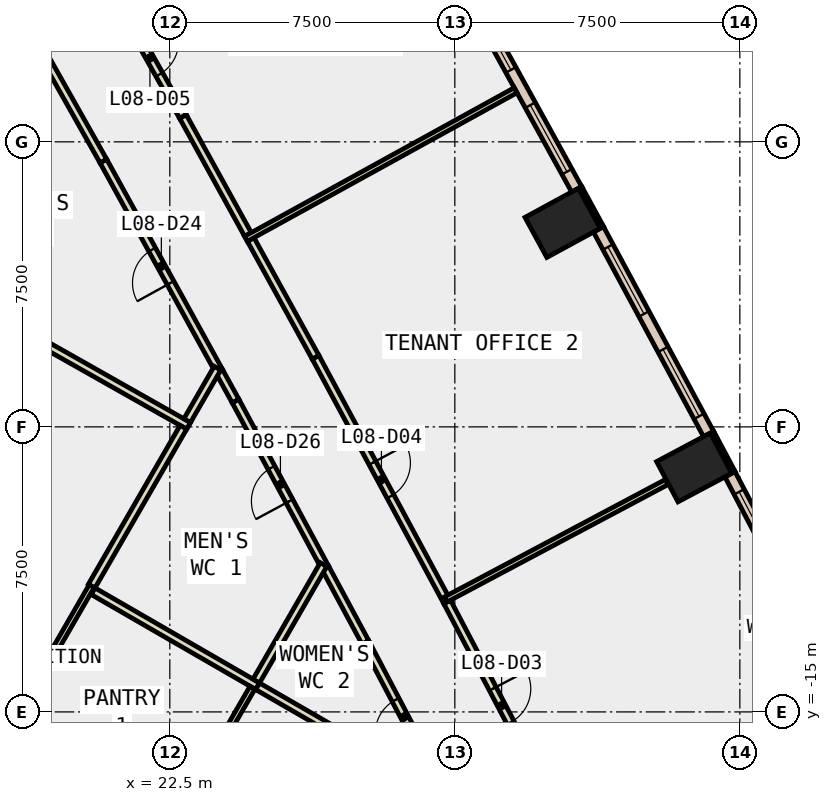
"""IFC4 building model, lengths in metres.
Left out: names, types, materials, properties, quantities, classifications, styles, units other than length and angle.
Written with IfcOpenShell. Run it as: python <this file> out.ifc"""

import sys

from ifc_helpers import new_model, si_unit, direction, frame, frame_2d, origin, origin_2d, place, context, subcontext, project, spatial, rectangle, extrude, element, fill, save


model = new_model("IFC4")
c1 = context("Model", 3, precision=1e-05, world=origin(), true_north=direction((0.0, 1.0)))
c2 = subcontext(c1, "Body", "Model", "MODEL_VIEW")
j1 = project(units=[si_unit("LENGTHUNIT", "METRE"), si_unit("PLANEANGLEUNIT", "RADIAN")], contexts=[c1])
p1 = place(None, origin())
s1 = spatial("IfcSite", under=j1, at=p1, CompositionType="ELEMENT")
p2 = place(p1, origin())
s2 = spatial("IfcBuilding", under=s1, at=p2, CompositionType="ELEMENT")
p3 = place(p2, frame((0.0, 0.0, 43.4)))
s3 = spatial("IfcBuildingStorey", under=s2, at=p3, CompositionType="ELEMENT", Elevation=43.4)
for number, where, z_axis, x_axis in (
    (1, (36.298, -8.567, -0.4), (0.0, 0.0, 1.0), (-0.469, 0.883, 0.0)),
    (2, (32.837, -2.132, -0.4), (0.0, 0.0, 1.0), (-0.478, 0.878, 0.0)),
):
    element("IfcColumn", number, at=place(p3, frame(where, z_axis=z_axis, x_axis=x_axis)), inside=s3, PredefinedType="COLUMN", context=c2, shape_type="SweptSolid", body=[
        extrude(rectangle(XDim=1.2, YDim=1.6, at=origin_2d()), origin(), (0.0, 0.0, 1.0), 4.2),
    ])
p4 = place(p3, frame((37.33, -8.698, 0.0), z_axis=(0.0, 0.0, 1.0), x_axis=(-0.469383408131, 0.882994459876, 0.0)))
e3 = element("IfcWall", 3, at=p4, inside=s3, PredefinedType="STANDARD", context=c2, shape_type="SweptSolid", body=[
    extrude(rectangle(XDim=1.199, YDim=0.1, at=frame_2d((0.6, 0.0))), origin(), (0.0, 0.0, 1.0), 3.8),
])
p5 = place(p3, frame((33.87, -2.253, 0.0), z_axis=(0.0, 0.0, 1.0), x_axis=(-0.478424520456, 0.878128679765, 0.0)))
e4 = element("IfcWall", 4, at=p5, inside=s3, PredefinedType="STANDARD", context=c2, shape_type="SweptSolid", body=[
    extrude(rectangle(XDim=1.2, YDim=0.1, at=frame_2d((0.6, 0.0))), origin(), (0.0, 0.0, 1.0), 3.8),
])
p6 = place(p3, frame((40.072, -14.141, 0.0), z_axis=(0.0, 0.0, 1.0), x_axis=(-0.464913987781, 0.885355851602, 0.0)))
e5 = element("IfcWall", 5, at=p6, inside=s3, PredefinedType="STANDARD", context=c2, shape_type="SweptSolid", body=[
    extrude(rectangle(XDim=6.094, YDim=0.3, at=frame_2d((3.047, 0.0))), origin(), (0.0, 0.0, 1.0), 3.8),
])
p7 = place(p6, frame((0.523, 0.0, 0.9)))
e6 = element("IfcOpeningElement", 6, at=p7, cuts=e5, PredefinedType="OPENING", context=c2, shape_type="SweptSolid", body=[
    extrude(rectangle(XDim=2.0, YDim=2.6, at=frame_2d((1.0, 1.3))), frame((0.0, 0.16, 0.0), z_axis=(0.0, -1.0, 0.0), x_axis=(1.0, 0.0, 0.0)), (0.0, 0.0, 1.0), 0.32),
])
p8 = place(p6, frame((3.57, 0.0, 0.9)))
e7 = element("IfcOpeningElement", 7, at=p8, cuts=e5, PredefinedType="OPENING", context=c2, shape_type="SweptSolid", body=[
    extrude(rectangle(XDim=2.0, YDim=2.6, at=frame_2d((1.0, 1.3))), frame((0.0, 0.16, 0.0), z_axis=(0.0, -1.0, 0.0), x_axis=(1.0, 0.0, 0.0)), (0.0, 0.0, 1.0), 0.32),
])
p9 = place(p3, frame((36.677, -7.688, 0.0), z_axis=(0.0, 0.0, 1.0), x_axis=(-0.47375467653, 0.880656860795, 0.0)))
e8 = element("IfcWall", 8, at=p9, inside=s3, PredefinedType="STANDARD", context=c2, shape_type="SweptSolid", body=[
    extrude(rectangle(XDim=6.117, YDim=0.3, at=frame_2d((3.059, 0.0))), origin(), (0.0, 0.0, 1.0), 3.8),
])
p10 = place(p9, frame((0.529, 0.0, 0.9)))
e9 = element("IfcOpeningElement", 9, at=p10, cuts=e8, PredefinedType="OPENING", context=c2, shape_type="SweptSolid", body=[
    extrude(rectangle(XDim=2.0, YDim=2.6, at=frame_2d((1.0, 1.3))), frame((0.0, 0.16, 0.0), z_axis=(0.0, -1.0, 0.0), x_axis=(1.0, 0.0, 0.0)), (0.0, 0.0, 1.0), 0.32),
])
p11 = place(p9, frame((3.588, 0.0, 0.9)))
e10 = element("IfcOpeningElement", 10, at=p11, cuts=e8, PredefinedType="OPENING", context=c2, shape_type="SweptSolid", body=[
    extrude(rectangle(XDim=2.0, YDim=2.6, at=frame_2d((1.0, 1.3))), frame((0.0, 0.16, 0.0), z_axis=(0.0, -1.0, 0.0), x_axis=(1.0, 0.0, 0.0)), (0.0, 0.0, 1.0), 0.32),
])
p12 = place(p3, frame((33.206, -1.249, 0.0), z_axis=(0.0, 0.0, 1.0), x_axis=(-0.482596003603, 0.875843078015, 0.0)))
e11 = element("IfcWall", 11, at=p12, inside=s3, PredefinedType="STANDARD", context=c2, shape_type="SweptSolid", body=[
    extrude(rectangle(XDim=6.115, YDim=0.3, at=frame_2d((3.058, 0.0))), origin(), (0.0, 0.0, 1.0), 3.8),
])
p13 = place(p12, frame((0.529, 0.0, 0.9)))
e12 = element("IfcOpeningElement", 12, at=p13, cuts=e11, PredefinedType="OPENING", context=c2, shape_type="SweptSolid", body=[
    extrude(rectangle(XDim=2.0, YDim=2.6, at=frame_2d((1.0, 1.3))), frame((0.0, 0.16, 0.0), z_axis=(0.0, -1.0, 0.0), x_axis=(1.0, 0.0, 0.0)), (0.0, 0.0, 1.0), 0.32),
])
p14 = place(p12, frame((3.586, 0.0, 0.9)))
e13 = element("IfcOpeningElement", 13, at=p14, cuts=e11, PredefinedType="OPENING", context=c2, shape_type="SweptSolid", body=[
    extrude(rectangle(XDim=2.0, YDim=2.6, at=frame_2d((1.0, 1.3))), frame((0.0, 0.16, 0.0), z_axis=(0.0, -1.0, 0.0), x_axis=(1.0, 0.0, 0.0)), (0.0, 0.0, 1.0), 0.32),
])
p15 = place(p3, frame((23.803, -6.044, 0.0), z_axis=(0.0, 0.0, 1.0), x_axis=(-0.482588436287, 0.875847247619, 0.0)))
e14 = element("IfcWall", 14, at=p15, inside=s3, PredefinedType="PARTITIONING", context=c2, shape_type="SweptSolid", body=[
    extrude(rectangle(XDim=6.324, YDim=0.2, at=frame_2d((3.162, 0.0))), origin(), (0.0, 0.0, 1.0), 3.8),
])
p16 = place(p15, frame((2.662, 0.0, 0.0)))
e15 = element("IfcOpeningElement", 15, at=p16, cuts=e14, PredefinedType="OPENING", context=c2, shape_type="SweptSolid", body=[
    extrude(rectangle(XDim=1.0, YDim=2.1, at=frame_2d((0.5, 1.05))), frame((0.0, 0.11, 0.0), z_axis=(0.0, -1.0, 0.0), x_axis=(1.0, 0.0, 0.0)), (0.0, 0.0, 1.0), 0.22),
])
p17 = place(p3, frame((20.751, -0.505, 0.0), z_axis=(0.0, 0.0, 1.0), x_axis=(-0.491284712602, 0.870999041999, 0.0)))
e16 = element("IfcWall", 16, at=p17, inside=s3, PredefinedType="PARTITIONING", context=c2, shape_type="SweptSolid", body=[
    extrude(rectangle(XDim=4.166, YDim=0.2, at=frame_2d((2.083, 0.0))), origin(), (0.0, 0.0, 1.0), 3.8),
])
p18 = place(p3, frame((26.592, -11.211, 0.0), z_axis=(0.0, 0.0, 1.0), x_axis=(-0.473737860011, 0.880665907136, 0.0)))
e17 = element("IfcWall", 17, at=p18, inside=s3, PredefinedType="PARTITIONING", context=c2, shape_type="SweptSolid", body=[
    extrude(rectangle(XDim=4.988, YDim=0.2, at=frame_2d((2.494, 0.0))), origin(), (0.0, 0.0, 1.0), 3.8),
])
p19 = place(p18, frame((1.994, 0.0, 0.0)))
e18 = element("IfcOpeningElement", 18, at=p19, cuts=e17, PredefinedType="OPENING", context=c2, shape_type="SweptSolid", body=[
    extrude(rectangle(XDim=1.0, YDim=2.1, at=frame_2d((0.5, 1.05))), frame((0.0, 0.11, 0.0), z_axis=(0.0, -1.0, 0.0), x_axis=(1.0, 0.0, 0.0)), (0.0, 0.0, 1.0), 0.22),
])
p20 = place(p3, frame((24.229, -6.818, 0.0), z_axis=(0.0, 0.0, 1.0), x_axis=(-0.482120251302, 0.876105052653, 0.0)))
e19 = element("IfcWall", 19, at=p20, inside=s3, PredefinedType="PARTITIONING", context=c2, shape_type="SweptSolid", body=[
    extrude(rectangle(XDim=0.884, YDim=0.2, at=frame_2d((0.442, 0.0))), origin(), (0.0, 0.0, 1.0), 3.8),
])
p21 = place(p3, frame((29.702, -17.085, 0.0), z_axis=(0.0, 0.0, 1.0), x_axis=(-0.464998228159, 0.88531161057, 0.0)))
e20 = element("IfcWall", 20, at=p21, inside=s3, PredefinedType="PARTITIONING", context=c2, shape_type="SweptSolid", body=[
    extrude(rectangle(XDim=4.426, YDim=0.2, at=frame_2d((2.213, 0.0))), origin(), (0.0, 0.0, 1.0), 3.8),
])
p22 = place(p21, frame((1.713, 0.0, 0.0)))
e21 = element("IfcOpeningElement", 21, at=p22, cuts=e20, PredefinedType="OPENING", context=c2, shape_type="SweptSolid", body=[
    extrude(rectangle(XDim=1.0, YDim=2.1, at=frame_2d((0.5, 1.05))), frame((0.0, 0.11, 0.0), z_axis=(0.0, -1.0, 0.0), x_axis=(1.0, 0.0, 0.0)), (0.0, 0.0, 1.0), 0.22),
])
p23 = place(p3, frame((27.644, -13.167, 0.0), z_axis=(0.0, 0.0, 1.0), x_axis=(-0.473660574093, 0.880707477287, 0.0)))
e22 = element("IfcWall", 22, at=p23, inside=s3, PredefinedType="PARTITIONING", context=c2, shape_type="SweptSolid", body=[
    extrude(rectangle(XDim=2.221, YDim=0.2, at=frame_2d((1.11, 0.0))), origin(), (0.0, 0.0, 1.0), 3.8),
])
p24 = place(p3, frame((29.799, -12.107, 0.0), z_axis=(0.0, 0.0, 1.0), x_axis=(0.464767882002, -0.885432558617, 0.0)))
e23 = element("IfcWall", 23, at=p24, inside=s3, PredefinedType="PARTITIONING", context=c2, shape_type="SweptSolid", body=[
    extrude(rectangle(XDim=6.233, YDim=0.2, at=frame_2d((3.117, 0.0))), origin(), (0.0, 0.0, 1.0), 3.8),
])
p25 = place(p24, frame((2.58, 0.0, 0.0)))
e24 = element("IfcOpeningElement", 24, at=p25, cuts=e23, PredefinedType="OPENING", context=c2, shape_type="SweptSolid", body=[
    extrude(rectangle(XDim=1.0, YDim=2.1, at=frame_2d((0.5, 1.05))), frame((0.0, 0.11, 0.0), z_axis=(0.0, -1.0, 0.0), x_axis=(1.0, 0.0, 0.0)), (0.0, 0.0, 1.0), 0.22),
])
p26 = place(p3, frame((24.628, -2.569, 0.0), z_axis=(0.0, 0.0, 1.0), x_axis=(0.482566980384, -0.875859069396, 0.0)))
e25 = element("IfcWall", 25, at=p26, inside=s3, PredefinedType="PARTITIONING", context=c2, shape_type="SweptSolid", body=[
    extrude(rectangle(XDim=3.542, YDim=0.2, at=frame_2d((1.771, 0.0))), origin(), (0.0, 0.0, 1.0), 3.8),
])
p27 = place(p3, frame((26.337, -5.671, 0.0), z_axis=(0.0, 0.0, 1.0), x_axis=(0.473794961698, -0.880635187958, 0.0)))
e26 = element("IfcWall", 26, at=p27, inside=s3, PredefinedType="PARTITIONING", context=c2, shape_type="SweptSolid", body=[
    extrude(rectangle(XDim=7.307, YDim=0.2, at=frame_2d((3.654, 0.0))), origin(), (0.0, 0.0, 1.0), 3.8),
])
p28 = place(p27, frame((3.154, 0.0, 0.0)))
e27 = element("IfcOpeningElement", 27, at=p28, cuts=e26, PredefinedType="OPENING", context=c2, shape_type="SweptSolid", body=[
    extrude(rectangle(XDim=1.0, YDim=2.1, at=frame_2d((0.5, 1.05))), frame((0.0, 0.11, 0.0), z_axis=(0.0, -1.0, 0.0), x_axis=(1.0, 0.0, 0.0)), (0.0, 0.0, 1.0), 0.22),
])
p29 = place(p3, frame((21.107, 3.749, 0.0), z_axis=(0.0, 0.0, 1.0), x_axis=(0.491268894998, -0.871007963687, 0.0)))
e28 = element("IfcWall", 28, at=p29, inside=s3, PredefinedType="PARTITIONING", context=c2, shape_type="SweptSolid", body=[
    extrude(rectangle(XDim=3.542, YDim=0.2, at=frame_2d((1.771, 0.0))), origin(), (0.0, 0.0, 1.0), 3.8),
])
p30 = place(p29, frame((1.271, 0.0, 0.0)))
e29 = element("IfcOpeningElement", 29, at=p30, cuts=e28, PredefinedType="OPENING", context=c2, shape_type="SweptSolid", body=[
    extrude(rectangle(XDim=1.0, YDim=2.1, at=frame_2d((0.5, 1.05))), frame((0.0, 0.11, 0.0), z_axis=(0.0, -1.0, 0.0), x_axis=(1.0, 0.0, 0.0)), (0.0, 0.0, 1.0), 0.22),
])
p31 = place(p3, frame((22.847, 0.664, 0.0), z_axis=(0.0, 0.0, 1.0), x_axis=(0.482537844436, -0.875875121628, 0.0)))
e30 = element("IfcWall", 30, at=p31, inside=s3, PredefinedType="PARTITIONING", context=c2, shape_type="SweptSolid", body=[
    extrude(rectangle(XDim=3.542, YDim=0.2, at=frame_2d((1.771, 0.0))), origin(), (0.0, 0.0, 1.0), 3.8),
])
p32 = place(p3, frame((15.072, -2.994, 0.0), z_axis=(0.0, 0.0, 1.0), x_axis=(0.87054185148, -0.49209438609, 0.0)))
e31 = element("IfcWall", 31, at=p32, inside=s3, PredefinedType="PARTITIONING", context=c2, shape_type="SweptSolid", body=[
    extrude(rectangle(XDim=9.1, YDim=0.2, at=frame_2d((4.55, 0.0))), origin(), (0.0, 0.0, 1.0), 3.8),
])
p33 = place(p3, frame((20.445, -11.688, 0.0), z_axis=(0.0, 0.0, 1.0), x_axis=(-0.500010633597, -0.866019264387, 0.0)))
e32 = element("IfcWall", 32, at=p33, inside=s3, PredefinedType="PARTITIONING", context=c2, shape_type="SweptSolid", body=[
    extrude(rectangle(XDim=6.918, YDim=0.15, at=frame_2d((3.459, 0.0))), origin(), (0.0, 0.0, 1.0), 3.8),
])
p34 = place(p3, frame((22.857, -7.51, 0.0), z_axis=(0.0, 0.0, 1.0), x_axis=(-0.499954636112, -0.866051593054, 0.0)))
e33 = element("IfcWall", 33, at=p34, inside=s3, PredefinedType="PARTITIONING", context=c2, shape_type="SweptSolid", body=[
    extrude(rectangle(XDim=4.824, YDim=0.2, at=frame_2d((2.412, 0.0))), origin(), (0.0, 0.0, 1.0), 3.8),
])
p35 = place(p3, frame((23.754, -5.956, 0.0), z_axis=(0.0, 0.0, 1.0), x_axis=(-0.500093796661, -0.865971243484, 0.0)))
e34 = element("IfcWall", 34, at=p35, inside=s3, PredefinedType="PARTITIONING", context=c2, shape_type="SweptSolid", body=[
    extrude(rectangle(XDim=1.594, YDim=0.2, at=frame_2d((0.797, 0.0))), origin(), (0.0, 0.0, 1.0), 3.8),
])
p36 = place(p3, frame((20.482, -11.824, 0.0), z_axis=(0.0, 0.0, 1.0), x_axis=(0.866022959057, -0.500004234368, 0.0)))
e35 = element("IfcWall", 35, at=p36, inside=s3, PredefinedType="PARTITIONING", context=c2, shape_type="SweptSolid", body=[
    extrude(rectangle(XDim=5.0, YDim=0.2, at=frame_2d((2.5, 0.0))), origin(), (0.0, 0.0, 1.0), 3.8),
])
p37 = place(p3, frame((24.675, -14.362, 0.0), z_axis=(0.0, 0.0, 1.0), x_axis=(-0.500187988959, -0.865916841101, 0.0)))
e36 = element("IfcWall", 36, at=p37, inside=s3, PredefinedType="PARTITIONING", context=c2, shape_type="SweptSolid", body=[
    extrude(rectangle(XDim=3.541, YDim=0.15, at=frame_2d((1.771, 0.0))), origin(), (0.0, 0.0, 1.0), 3.8),
])
p38 = place(p3, frame((26.545, -11.123, 0.0), z_axis=(0.0, 0.0, 1.0), x_axis=(-0.500100605862, -0.865967311171, 0.0)))
e37 = element("IfcWall", 37, at=p38, inside=s3, PredefinedType="PARTITIONING", context=c2, shape_type="SweptSolid", body=[
    extrude(rectangle(XDim=3.539, YDim=0.2, at=frame_2d((1.77, 0.0))), origin(), (0.0, 0.0, 1.0), 3.8),
])
p39 = place(p3, frame((24.811, -14.326, 0.0), z_axis=(0.0, 0.0, 1.0), x_axis=(0.866076195524, -0.499912015806, 0.0)))
e38 = element("IfcWall", 38, at=p39, inside=s3, PredefinedType="PARTITIONING", context=c2, shape_type="SweptSolid", body=[
    extrude(rectangle(XDim=5.797, YDim=0.2, at=frame_2d((2.899, 0.0))), origin(), (0.0, 0.0, 1.0), 3.8),
])
p40 = place(p3, frame((29.764, -12.04, 0.0), z_axis=(0.0, 0.0, 1.0), x_axis=(0.883018657393, 0.469337885426, 0.0)))
e39 = element("IfcWall", 39, at=p40, inside=s3, PredefinedType="PARTITIONING", context=c2, shape_type="SweptSolid", body=[
    extrude(rectangle(XDim=6.58, YDim=0.15, at=frame_2d((3.29, 0.0))), origin(), (0.0, 0.0, 1.0), 3.8),
])
p41 = place(p3, frame((24.505, -2.552, 0.0), z_axis=(0.0, 0.0, 1.0), x_axis=(0.875845276652, 0.482592013369, 0.0)))
e40 = element("IfcWall", 40, at=p41, inside=s3, PredefinedType="PARTITIONING", context=c2, shape_type="SweptSolid", body=[
    extrude(rectangle(XDim=8.1, YDim=0.15, at=frame_2d((4.05, 0.0))), origin(), (0.0, 0.0, 1.0), 3.8),
])
p42 = place(p8, origin())
e41 = element("IfcWindow", 41, at=p42, inside=s3, PartitioningType="SINGLE_PANEL", PredefinedType="WINDOW", context=c2, shape_type="SweptSolid", body=[
    extrude(rectangle(XDim=2.0, YDim=2.6, at=frame_2d((1.0, 1.3))), frame((0.0, 0.03, 0.0), z_axis=(0.0, -1.0, 0.0), x_axis=(1.0, 0.0, 0.0)), (0.0, 0.0, 1.0), 0.06),
])
fill(e7, e41)
p43 = place(p10, origin())
e42 = element("IfcWindow", 42, at=p43, inside=s3, PartitioningType="SINGLE_PANEL", PredefinedType="WINDOW", context=c2, shape_type="SweptSolid", body=[
    extrude(rectangle(XDim=2.0, YDim=2.6, at=frame_2d((1.0, 1.3))), frame((0.0, 0.03, 0.0), z_axis=(0.0, -1.0, 0.0), x_axis=(1.0, 0.0, 0.0)), (0.0, 0.0, 1.0), 0.06),
])
fill(e9, e42)
p44 = place(p11, origin())
e43 = element("IfcWindow", 43, at=p44, inside=s3, PartitioningType="SINGLE_PANEL", PredefinedType="WINDOW", context=c2, shape_type="SweptSolid", body=[
    extrude(rectangle(XDim=2.0, YDim=2.6, at=frame_2d((1.0, 1.3))), frame((0.0, 0.03, 0.0), z_axis=(0.0, -1.0, 0.0), x_axis=(1.0, 0.0, 0.0)), (0.0, 0.0, 1.0), 0.06),
])
fill(e10, e43)
p45 = place(p13, origin())
e44 = element("IfcWindow", 44, at=p45, inside=s3, PartitioningType="SINGLE_PANEL", PredefinedType="WINDOW", context=c2, shape_type="SweptSolid", body=[
    extrude(rectangle(XDim=2.0, YDim=2.6, at=frame_2d((1.0, 1.3))), frame((0.0, 0.03, 0.0), z_axis=(0.0, -1.0, 0.0), x_axis=(1.0, 0.0, 0.0)), (0.0, 0.0, 1.0), 0.06),
])
fill(e12, e44)
p46 = place(p14, origin())
e45 = element("IfcWindow", 45, at=p46, inside=s3, PartitioningType="SINGLE_PANEL", PredefinedType="WINDOW", context=c2, shape_type="SweptSolid", body=[
    extrude(rectangle(XDim=2.0, YDim=2.6, at=frame_2d((1.0, 1.3))), frame((0.0, 0.03, 0.0), z_axis=(0.0, -1.0, 0.0), x_axis=(1.0, 0.0, 0.0)), (0.0, 0.0, 1.0), 0.06),
])
fill(e13, e45)
p47 = place(p25, origin())
e46 = element("IfcDoor", 46, at=p47, inside=s3, OperationType="SINGLE_SWING_LEFT", PredefinedType="DOOR", context=c2, shape_type="SweptSolid", body=[
    extrude(rectangle(XDim=1.0, YDim=2.1, at=frame_2d((0.5, 1.05))), frame((0.0, 0.025, 0.0), z_axis=(0.0, -1.0, 0.0), x_axis=(1.0, 0.0, 0.0)), (0.0, 0.0, 1.0), 0.05),
])
fill(e24, e46)
p48 = place(p28, origin())
e47 = element("IfcDoor", 47, at=p48, inside=s3, OperationType="SINGLE_SWING_LEFT", PredefinedType="DOOR", context=c2, shape_type="SweptSolid", body=[
    extrude(rectangle(XDim=1.0, YDim=2.1, at=frame_2d((0.5, 1.05))), frame((0.0, 0.025, 0.0), z_axis=(0.0, -1.0, 0.0), x_axis=(1.0, 0.0, 0.0)), (0.0, 0.0, 1.0), 0.05),
])
fill(e27, e47)
p49 = place(p30, origin())
e48 = element("IfcDoor", 48, at=p49, inside=s3, OperationType="SINGLE_SWING_LEFT", PredefinedType="DOOR", context=c2, shape_type="SweptSolid", body=[
    extrude(rectangle(XDim=1.0, YDim=2.1, at=frame_2d((0.5, 1.05))), frame((0.0, 0.025, 0.0), z_axis=(0.0, -1.0, 0.0), x_axis=(1.0, 0.0, 0.0)), (0.0, 0.0, 1.0), 0.05),
])
fill(e29, e48)
p50 = place(p16, origin())
e49 = element("IfcDoor", 49, at=p50, inside=s3, OperationType="SINGLE_SWING_LEFT", PredefinedType="DOOR", context=c2, shape_type="SweptSolid", body=[
    extrude(rectangle(XDim=1.0, YDim=2.1, at=frame_2d((0.5, 1.05))), frame((0.0, 0.025, 0.0), z_axis=(0.0, -1.0, 0.0), x_axis=(1.0, 0.0, 0.0)), (0.0, 0.0, 1.0), 0.05),
])
fill(e15, e49)
p51 = place(p19, origin())
e50 = element("IfcDoor", 50, at=p51, inside=s3, OperationType="SINGLE_SWING_LEFT", PredefinedType="DOOR", context=c2, shape_type="SweptSolid", body=[
    extrude(rectangle(XDim=1.0, YDim=2.1, at=frame_2d((0.5, 1.05))), frame((0.0, 0.025, 0.0), z_axis=(0.0, -1.0, 0.0), x_axis=(1.0, 0.0, 0.0)), (0.0, 0.0, 1.0), 0.05),
])
fill(e18, e50)
p52 = place(p22, origin())
e51 = element("IfcDoor", 51, at=p52, inside=s3, OperationType="SINGLE_SWING_LEFT", PredefinedType="DOOR", context=c2, shape_type="SweptSolid", body=[
    extrude(rectangle(XDim=1.0, YDim=2.1, at=frame_2d((0.5, 1.05))), frame((0.0, 0.025, 0.0), z_axis=(0.0, -1.0, 0.0), x_axis=(1.0, 0.0, 0.0)), (0.0, 0.0, 1.0), 0.05),
])
fill(e21, e51)
save(model, sys.argv[1])
